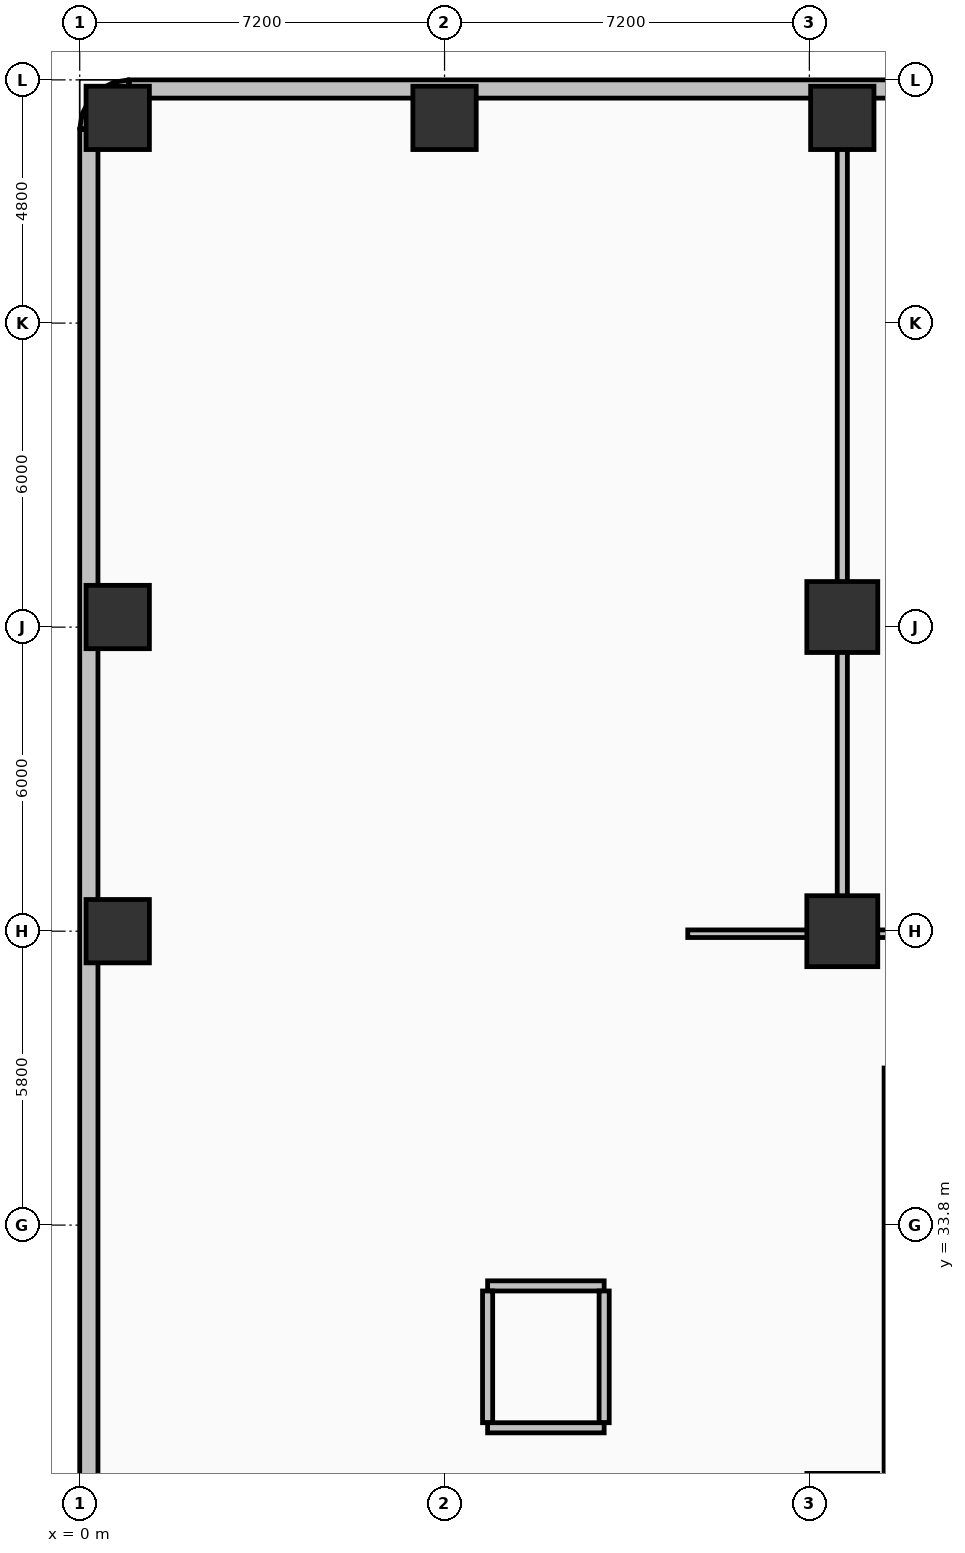
"""IFC4 building model, lengths in metres.
Left out: names, types, materials, properties, quantities, classifications, styles, units other than length and angle.
Written with IfcOpenShell. Run it as: python <this file> out.ifc"""

import sys

from ifc_helpers import new_model, si_unit, direction, frame, frame_2d, origin, origin_2d, place, context, subcontext, project, spatial, rectangle, extrude, element, fill, save


model = new_model("IFC4")
c1 = context("Model", 3, precision=1e-05, world=origin(), true_north=direction((0.0, 1.0)))
c2 = subcontext(c1, "Body", "Model", "MODEL_VIEW")
j1 = project(units=[si_unit("LENGTHUNIT", "METRE"), si_unit("PLANEANGLEUNIT", "RADIAN")], contexts=[c1])
p1 = place(None, origin())
s1 = spatial("IfcSite", under=j1, at=p1, CompositionType="ELEMENT")
p2 = place(p1, origin())
s2 = spatial("IfcBuilding", under=s1, at=p2, CompositionType="ELEMENT")
p3 = place(p2, frame((0.0, 0.0, 11.1)))
s3 = spatial("IfcBuildingStorey", under=s2, at=p3, CompositionType="ELEMENT", Elevation=11.1)
for number, where, z_axis, x_axis in (
    (1, (0.75, 39.6, 0.0), (0.0, 0.0, 1.0), (1.0, 0.0, 0.0)),
    (2, (0.75, 45.8, 0.0), (0.0, 0.0, 1.0), (1.0, 0.0, 0.0)),
    (3, (0.75, 55.65, 0.0), (0.0, 0.0, 1.0), (1.0, 0.0, 0.0)),
    (4, (7.2, 55.65, 0.0), (0.0, 0.0, 1.0), (1.0, 0.0, 0.0)),
    (5, (15.05, 55.65, 0.0), (0.0, 0.0, 1.0), (1.0, 0.0, 0.0)),
):
    element("IfcColumn", number, at=place(p3, frame(where, z_axis=z_axis, x_axis=x_axis)), inside=s3, PredefinedType="COLUMN", context=c2, shape_type="SweptSolid", body=[
        extrude(rectangle(XDim=1.25, YDim=1.25, at=origin_2d()), origin(), (0.0, 0.0, 1.0), 4.5),
    ])
for number, where, z_axis, x_axis in (
    (6, (15.05, 39.6, 0.0), (0.0, 0.0, 1.0), (1.0, 0.0, 0.0)),
    (7, (15.05, 45.8, 0.0), (0.0, 0.0, 1.0), (1.0, 0.0, 0.0)),
):
    element("IfcColumn", number, at=place(p3, frame(where, z_axis=z_axis, x_axis=x_axis)), inside=s3, PredefinedType="COLUMN", context=c2, shape_type="SweptSolid", body=[
        extrude(rectangle(XDim=1.4, YDim=1.4, at=origin_2d()), origin(), (0.0, 0.0, 1.0), 4.5),
    ])
p4 = place(p3, frame((56.57, 56.22, 0.0), z_axis=(0.0, 0.0, 1.0), x_axis=(-1.0, 0.0, 0.0)))
e8 = element("IfcWall", 8, at=p4, inside=s3, PredefinedType="SOLIDWALL", context=c2, shape_type="SweptSolid", body=[
    extrude(rectangle(XDim=55.59, YDim=0.36, at=frame_2d((27.795, 0.0))), origin(), (0.0, 0.0, 1.0), 3.48),
])
p5 = place(p4, frame((0.747, 0.0, 0.9)))
e9 = element("IfcOpeningElement", 9, at=p5, cuts=e8, PredefinedType="OPENING", context=c2, shape_type="SweptSolid", body=[
    extrude(rectangle(XDim=1.8, YDim=2.1, at=frame_2d((0.9, 1.05))), frame((0.0, 0.19, 0.0), z_axis=(0.0, -1.0, 0.0), x_axis=(1.0, 0.0, 0.0)), (0.0, 0.0, 1.0), 0.38),
])
p6 = place(p4, frame((5.19, 0.0, 0.9)))
e10 = element("IfcOpeningElement", 10, at=p6, cuts=e8, PredefinedType="OPENING", context=c2, shape_type="SweptSolid", body=[
    extrude(rectangle(XDim=1.8, YDim=2.1, at=frame_2d((0.9, 1.05))), frame((0.0, 0.19, 0.0), z_axis=(0.0, -1.0, 0.0), x_axis=(1.0, 0.0, 0.0)), (0.0, 0.0, 1.0), 0.38),
])
p7 = place(p4, frame((8.233, 0.0, 0.9)))
e11 = element("IfcOpeningElement", 11, at=p7, cuts=e8, PredefinedType="OPENING", context=c2, shape_type="SweptSolid", body=[
    extrude(rectangle(XDim=1.8, YDim=2.1, at=frame_2d((0.9, 1.05))), frame((0.0, 0.19, 0.0), z_axis=(0.0, -1.0, 0.0), x_axis=(1.0, 0.0, 0.0)), (0.0, 0.0, 1.0), 0.38),
])
p8 = place(p4, frame((11.626, 0.0, 0.9)))
e12 = element("IfcOpeningElement", 12, at=p8, cuts=e8, PredefinedType="OPENING", context=c2, shape_type="SweptSolid", body=[
    extrude(rectangle(XDim=1.8, YDim=2.1, at=frame_2d((0.9, 1.05))), frame((0.0, 0.19, 0.0), z_axis=(0.0, -1.0, 0.0), x_axis=(1.0, 0.0, 0.0)), (0.0, 0.0, 1.0), 0.38),
])
p9 = place(p4, frame((14.319, 0.0, 0.9)))
e13 = element("IfcOpeningElement", 13, at=p9, cuts=e8, PredefinedType="OPENING", context=c2, shape_type="SweptSolid", body=[
    extrude(rectangle(XDim=1.8, YDim=2.1, at=frame_2d((0.9, 1.05))), frame((0.0, 0.19, 0.0), z_axis=(0.0, -1.0, 0.0), x_axis=(1.0, 0.0, 0.0)), (0.0, 0.0, 1.0), 0.38),
])
p10 = place(p4, frame((18.762, 0.0, 0.9)))
e14 = element("IfcOpeningElement", 14, at=p10, cuts=e8, PredefinedType="OPENING", context=c2, shape_type="SweptSolid", body=[
    extrude(rectangle(XDim=1.8, YDim=2.1, at=frame_2d((0.9, 1.05))), frame((0.0, 0.19, 0.0), z_axis=(0.0, -1.0, 0.0), x_axis=(1.0, 0.0, 0.0)), (0.0, 0.0, 1.0), 0.38),
])
p11 = place(p4, frame((21.805, 0.0, 0.9)))
e15 = element("IfcOpeningElement", 15, at=p11, cuts=e8, PredefinedType="OPENING", context=c2, shape_type="SweptSolid", body=[
    extrude(rectangle(XDim=1.8, YDim=2.1, at=frame_2d((0.9, 1.05))), frame((0.0, 0.19, 0.0), z_axis=(0.0, -1.0, 0.0), x_axis=(1.0, 0.0, 0.0)), (0.0, 0.0, 1.0), 0.38),
])
p12 = place(p4, frame((25.198, 0.0, 0.9)))
e16 = element("IfcOpeningElement", 16, at=p12, cuts=e8, PredefinedType="OPENING", context=c2, shape_type="SweptSolid", body=[
    extrude(rectangle(XDim=1.8, YDim=2.1, at=frame_2d((0.9, 1.05))), frame((0.0, 0.19, 0.0), z_axis=(0.0, -1.0, 0.0), x_axis=(1.0, 0.0, 0.0)), (0.0, 0.0, 1.0), 0.38),
])
p13 = place(p4, frame((27.892, 0.0, 0.9)))
e17 = element("IfcOpeningElement", 17, at=p13, cuts=e8, PredefinedType="OPENING", context=c2, shape_type="SweptSolid", body=[
    extrude(rectangle(XDim=1.8, YDim=2.1, at=frame_2d((0.9, 1.05))), frame((0.0, 0.19, 0.0), z_axis=(0.0, -1.0, 0.0), x_axis=(1.0, 0.0, 0.0)), (0.0, 0.0, 1.0), 0.38),
])
p14 = place(p4, frame((32.335, 0.0, 0.9)))
e18 = element("IfcOpeningElement", 18, at=p14, cuts=e8, PredefinedType="OPENING", context=c2, shape_type="SweptSolid", body=[
    extrude(rectangle(XDim=1.8, YDim=2.1, at=frame_2d((0.9, 1.05))), frame((0.0, 0.19, 0.0), z_axis=(0.0, -1.0, 0.0), x_axis=(1.0, 0.0, 0.0)), (0.0, 0.0, 1.0), 0.38),
])
p15 = place(p4, frame((35.378, 0.0, 0.9)))
e19 = element("IfcOpeningElement", 19, at=p15, cuts=e8, PredefinedType="OPENING", context=c2, shape_type="SweptSolid", body=[
    extrude(rectangle(XDim=1.8, YDim=2.1, at=frame_2d((0.9, 1.05))), frame((0.0, 0.19, 0.0), z_axis=(0.0, -1.0, 0.0), x_axis=(1.0, 0.0, 0.0)), (0.0, 0.0, 1.0), 0.38),
])
p16 = place(p4, frame((38.421, 0.0, 0.9)))
e20 = element("IfcOpeningElement", 20, at=p16, cuts=e8, PredefinedType="OPENING", context=c2, shape_type="SweptSolid", body=[
    extrude(rectangle(XDim=1.8, YDim=2.1, at=frame_2d((0.9, 1.05))), frame((0.0, 0.19, 0.0), z_axis=(0.0, -1.0, 0.0), x_axis=(1.0, 0.0, 0.0)), (0.0, 0.0, 1.0), 0.38),
])
p17 = place(p4, frame((42.864, 0.0, 0.9)))
e21 = element("IfcOpeningElement", 21, at=p17, cuts=e8, PredefinedType="OPENING", context=c2, shape_type="SweptSolid", body=[
    extrude(rectangle(XDim=1.8, YDim=2.1, at=frame_2d((0.9, 1.05))), frame((0.0, 0.19, 0.0), z_axis=(0.0, -1.0, 0.0), x_axis=(1.0, 0.0, 0.0)), (0.0, 0.0, 1.0), 0.38),
])
p18 = place(p4, frame((45.557, 0.0, 0.9)))
e22 = element("IfcOpeningElement", 22, at=p18, cuts=e8, PredefinedType="OPENING", context=c2, shape_type="SweptSolid", body=[
    extrude(rectangle(XDim=1.8, YDim=2.1, at=frame_2d((0.9, 1.05))), frame((0.0, 0.19, 0.0), z_axis=(0.0, -1.0, 0.0), x_axis=(1.0, 0.0, 0.0)), (0.0, 0.0, 1.0), 0.38),
])
p19 = place(p4, frame((52.344, 0.0, 0.9)))
e23 = element("IfcOpeningElement", 23, at=p19, cuts=e8, PredefinedType="OPENING", context=c2, shape_type="SweptSolid", body=[
    extrude(rectangle(XDim=1.8, YDim=2.1, at=frame_2d((0.9, 1.05))), frame((0.0, 0.19, 0.0), z_axis=(0.0, -1.0, 0.0), x_axis=(1.0, 0.0, 0.0)), (0.0, 0.0, 1.0), 0.38),
])
p20 = place(p3, frame((0.98, 56.22, 0.0), z_axis=(0.0, 0.0, 1.0), x_axis=(-0.987731290312, -0.156163049852, 0.0)))
e24 = element("IfcWall", 24, at=p20, inside=s3, PredefinedType="SOLIDWALL", context=c2, shape_type="SweptSolid", body=[
    extrude(rectangle(XDim=0.25, YDim=0.36, at=frame_2d((0.125, 0.0))), origin(), (0.0, 0.0, 1.0), 3.48),
])
p21 = place(p3, frame((0.733, 56.181, 0.0), z_axis=(0.0, 0.0, 1.0), x_axis=(-0.89089067942, -0.454217786225, 0.0)))
e25 = element("IfcWall", 25, at=p21, inside=s3, PredefinedType="SOLIDWALL", context=c2, shape_type="SweptSolid", body=[
    extrude(rectangle(XDim=0.25, YDim=0.36, at=frame_2d((0.125, 0.0))), origin(), (0.0, 0.0, 1.0), 3.48),
])
for number, where, z_axis, x_axis in (
    (26, (0.51, 56.067, 0.0), (0.0, 0.0, 1.0), (-0.707, -0.707, 0.0)),
    (27, (0.333, 55.89, 0.0), (0.0, 0.0, 1.0), (-0.454, -0.891, 0.0)),
):
    element("IfcWall", number, at=place(p3, frame(where, z_axis=z_axis, x_axis=x_axis)), inside=s3, PredefinedType="SOLIDWALL", context=c2, shape_type="SweptSolid", body=[
        extrude(rectangle(XDim=0.25, YDim=0.36, at=frame_2d((0.125, 0.0))), origin(), (0.0, 0.0, 1.0), 3.48),
    ])
p22 = place(p3, frame((0.219, 55.667, 0.0), z_axis=(0.0, 0.0, 1.0), x_axis=(-0.156963773077, -0.987604361038, 0.0)))
e28 = element("IfcWall", 28, at=p22, inside=s3, PredefinedType="SOLIDWALL", context=c2, shape_type="SweptSolid", body=[
    extrude(rectangle(XDim=0.25, YDim=0.36, at=frame_2d((0.125, 0.0))), origin(), (0.0, 0.0, 1.0), 3.48),
])
p23 = place(p3, frame((0.18, 55.42, 0.0), z_axis=(0.0, 0.0, 1.0), x_axis=(0.0, -1.0, 0.0)))
e29 = element("IfcWall", 29, at=p23, inside=s3, PredefinedType="SOLIDWALL", context=c2, shape_type="SweptSolid", body=[
    extrude(rectangle(XDim=54.44, YDim=0.36, at=frame_2d((27.22, 0.0))), origin(), (0.0, 0.0, 1.0), 3.48),
])
p24 = place(p23, frame((1.411, 0.0, 0.9)))
e30 = element("IfcOpeningElement", 30, at=p24, cuts=e29, PredefinedType="OPENING", context=c2, shape_type="SweptSolid", body=[
    extrude(rectangle(XDim=1.8, YDim=2.1, at=frame_2d((0.9, 1.05))), frame((0.0, 0.19, 0.0), z_axis=(0.0, -1.0, 0.0), x_axis=(1.0, 0.0, 0.0)), (0.0, 0.0, 1.0), 0.38),
])
p25 = place(p23, frame((4.732, 0.0, 0.9)))
e31 = element("IfcOpeningElement", 31, at=p25, cuts=e29, PredefinedType="OPENING", context=c2, shape_type="SweptSolid", body=[
    extrude(rectangle(XDim=1.8, YDim=2.1, at=frame_2d((0.9, 1.05))), frame((0.0, 0.19, 0.0), z_axis=(0.0, -1.0, 0.0), x_axis=(1.0, 0.0, 0.0)), (0.0, 0.0, 1.0), 0.38),
])
p26 = place(p23, frame((11.375, 0.0, 0.9)))
e32 = element("IfcOpeningElement", 32, at=p26, cuts=e29, PredefinedType="OPENING", context=c2, shape_type="SweptSolid", body=[
    extrude(rectangle(XDim=1.8, YDim=2.1, at=frame_2d((0.9, 1.05))), frame((0.0, 0.19, 0.0), z_axis=(0.0, -1.0, 0.0), x_axis=(1.0, 0.0, 0.0)), (0.0, 0.0, 1.0), 0.38),
])
p27 = place(p23, frame((18.017, 0.0, 0.9)))
e33 = element("IfcOpeningElement", 33, at=p27, cuts=e29, PredefinedType="OPENING", context=c2, shape_type="SweptSolid", body=[
    extrude(rectangle(XDim=1.8, YDim=2.1, at=frame_2d((0.9, 1.05))), frame((0.0, 0.19, 0.0), z_axis=(0.0, -1.0, 0.0), x_axis=(1.0, 0.0, 0.0)), (0.0, 0.0, 1.0), 0.38),
])
p28 = place(p23, frame((21.338, 0.0, 0.9)))
e34 = element("IfcOpeningElement", 34, at=p28, cuts=e29, PredefinedType="OPENING", context=c2, shape_type="SweptSolid", body=[
    extrude(rectangle(XDim=1.8, YDim=2.1, at=frame_2d((0.9, 1.05))), frame((0.0, 0.19, 0.0), z_axis=(0.0, -1.0, 0.0), x_axis=(1.0, 0.0, 0.0)), (0.0, 0.0, 1.0), 0.38),
])
p29 = place(p23, frame((23.959, 0.0, 0.9)))
e35 = element("IfcOpeningElement", 35, at=p29, cuts=e29, PredefinedType="OPENING", context=c2, shape_type="SweptSolid", body=[
    extrude(rectangle(XDim=1.8, YDim=2.1, at=frame_2d((0.9, 1.05))), frame((0.0, 0.19, 0.0), z_axis=(0.0, -1.0, 0.0), x_axis=(1.0, 0.0, 0.0)), (0.0, 0.0, 1.0), 0.38),
])
p30 = place(p23, frame((28.681, 0.0, 0.9)))
e36 = element("IfcOpeningElement", 36, at=p30, cuts=e29, PredefinedType="OPENING", context=c2, shape_type="SweptSolid", body=[
    extrude(rectangle(XDim=1.8, YDim=2.1, at=frame_2d((0.9, 1.05))), frame((0.0, 0.19, 0.0), z_axis=(0.0, -1.0, 0.0), x_axis=(1.0, 0.0, 0.0)), (0.0, 0.0, 1.0), 0.38),
])
p31 = place(p23, frame((31.302, 0.0, 0.9)))
e37 = element("IfcOpeningElement", 37, at=p31, cuts=e29, PredefinedType="OPENING", context=c2, shape_type="SweptSolid", body=[
    extrude(rectangle(XDim=1.8, YDim=2.1, at=frame_2d((0.9, 1.05))), frame((0.0, 0.19, 0.0), z_axis=(0.0, -1.0, 0.0), x_axis=(1.0, 0.0, 0.0)), (0.0, 0.0, 1.0), 0.38),
])
p32 = place(p23, frame((34.623, 0.0, 0.9)))
e38 = element("IfcOpeningElement", 38, at=p32, cuts=e29, PredefinedType="OPENING", context=c2, shape_type="SweptSolid", body=[
    extrude(rectangle(XDim=1.8, YDim=2.1, at=frame_2d((0.9, 1.05))), frame((0.0, 0.19, 0.0), z_axis=(0.0, -1.0, 0.0), x_axis=(1.0, 0.0, 0.0)), (0.0, 0.0, 1.0), 0.38),
])
p33 = place(p23, frame((41.266, 0.0, 0.9)))
e39 = element("IfcOpeningElement", 39, at=p33, cuts=e29, PredefinedType="OPENING", context=c2, shape_type="SweptSolid", body=[
    extrude(rectangle(XDim=1.8, YDim=2.1, at=frame_2d((0.9, 1.05))), frame((0.0, 0.19, 0.0), z_axis=(0.0, -1.0, 0.0), x_axis=(1.0, 0.0, 0.0)), (0.0, 0.0, 1.0), 0.38),
])
p34 = place(p23, frame((47.908, 0.0, 0.9)))
e40 = element("IfcOpeningElement", 40, at=p34, cuts=e29, PredefinedType="OPENING", context=c2, shape_type="SweptSolid", body=[
    extrude(rectangle(XDim=1.8, YDim=2.1, at=frame_2d((0.9, 1.05))), frame((0.0, 0.19, 0.0), z_axis=(0.0, -1.0, 0.0), x_axis=(1.0, 0.0, 0.0)), (0.0, 0.0, 1.0), 0.38),
])
p35 = place(p23, frame((51.229, 0.0, 0.9)))
e41 = element("IfcOpeningElement", 41, at=p35, cuts=e29, PredefinedType="OPENING", context=c2, shape_type="SweptSolid", body=[
    extrude(rectangle(XDim=1.8, YDim=2.1, at=frame_2d((0.9, 1.05))), frame((0.0, 0.19, 0.0), z_axis=(0.0, -1.0, 0.0), x_axis=(1.0, 0.0, 0.0)), (0.0, 0.0, 1.0), 0.38),
])
p36 = place(p3, frame((8.05, 32.6, 0.0), z_axis=(0.0, 0.0, 1.0), x_axis=(1.0, 0.0, 0.0)))
e42 = element("IfcWall", 42, at=p36, inside=s3, PredefinedType="PARTITIONING", context=c2, shape_type="SweptSolid", body=[
    extrude(rectangle(XDim=2.3, YDim=0.2, at=frame_2d((1.15, 0.0))), origin(), (0.0, 0.0, 1.0), 3.42),
])
for number, where, z_axis, x_axis in (
    (43, (8.05, 29.9, 0.0), (0.0, 0.0, 1.0), (0.0, 1.0, 0.0)),
    (44, (10.35, 29.9, 0.0), (0.0, 0.0, 1.0), (0.0, 1.0, 0.0)),
):
    element("IfcWall", number, at=place(p3, frame(where, z_axis=z_axis, x_axis=x_axis)), inside=s3, PredefinedType="PARTITIONING", context=c2, shape_type="SweptSolid", body=[
        extrude(rectangle(XDim=2.6, YDim=0.2, at=frame_2d((1.3, 0.0))), origin(), (0.0, 0.0, 1.0), 3.42),
    ])
p37 = place(p3, frame((8.05, 29.8, 0.0), z_axis=(0.0, 0.0, 1.0), x_axis=(1.0, 0.0, 0.0)))
e45 = element("IfcWall", 45, at=p37, inside=s3, PredefinedType="PARTITIONING", context=c2, shape_type="SweptSolid", body=[
    extrude(rectangle(XDim=2.3, YDim=0.2, at=frame_2d((1.15, 0.0))), origin(), (0.0, 0.0, 1.0), 3.42),
])
p38 = place(p37, frame((0.65, 0.0, 0.0)))
e46 = element("IfcOpeningElement", 46, at=p38, cuts=e45, PredefinedType="OPENING", context=c2, shape_type="SweptSolid", body=[
    extrude(rectangle(XDim=1.0, YDim=2.15, at=frame_2d((0.5, 1.075))), frame((0.0, 0.11, 0.0), z_axis=(0.0, -1.0, 0.0), x_axis=(1.0, 0.0, 0.0)), (0.0, 0.0, 1.0), 0.22),
])
p39 = place(p3, frame((15.95, 19.5, 0.0), z_axis=(0.0, 0.0, 1.0), x_axis=(0.0, 1.0, 0.0)))
e47 = element("IfcWall", 47, at=p39, inside=s3, PredefinedType="PARTITIONING", context=c2, shape_type="SweptSolid", body=[
    extrude(rectangle(XDim=17.4, YDim=0.15, at=frame_2d((8.7, 0.0))), origin(), (0.0, 0.0, 1.0), 3.42),
])
p40 = place(p3, frame((15.05, 39.6, 0.0), z_axis=(0.0, 0.0, 1.0), x_axis=(0.0, 1.0, 0.0)))
e48 = element("IfcWall", 48, at=p40, inside=s3, PredefinedType="PARTITIONING", context=c2, shape_type="SweptSolid", body=[
    extrude(rectangle(XDim=16.4, YDim=0.2, at=frame_2d((8.2, 0.0))), origin(), (0.0, 0.0, 1.0), 3.42),
])
p41 = place(p40, frame((3.4, 0.0, 0.0)))
e49 = element("IfcOpeningElement", 49, at=p41, cuts=e48, PredefinedType="OPENING", context=c2, shape_type="SweptSolid", body=[
    extrude(rectangle(XDim=1.0, YDim=2.15, at=frame_2d((0.5, 1.075))), frame((0.0, 0.11, 0.0), z_axis=(0.0, -1.0, 0.0), x_axis=(1.0, 0.0, 0.0)), (0.0, 0.0, 1.0), 0.22),
])
p42 = place(p3, frame((25.25, 39.55, 0.0), z_axis=(0.0, 0.0, 1.0), x_axis=(-1.0, 0.0, 0.0)))
e50 = element("IfcWall", 50, at=p42, inside=s3, PredefinedType="PARTITIONING", context=c2, shape_type="SweptSolid", body=[
    extrude(rectangle(XDim=13.25, YDim=0.15, at=frame_2d((6.625, 0.0))), origin(), (0.0, 0.0, 1.0), 3.42),
])
p43 = place(p42, frame((4.2, 0.0, 0.0)))
e51 = element("IfcOpeningElement", 51, at=p43, cuts=e50, PredefinedType="OPENING", context=c2, shape_type="SweptSolid", body=[
    extrude(rectangle(XDim=1.0, YDim=2.15, at=frame_2d((0.5, 1.075))), frame((0.0, 0.085, 0.0), z_axis=(0.0, -1.0, 0.0), x_axis=(1.0, 0.0, 0.0)), (0.0, 0.0, 1.0), 0.17),
])
p44 = place(p17, origin())
e52 = element("IfcWindow", 52, at=p44, inside=s3, PartitioningType="SINGLE_PANEL", PredefinedType="WINDOW", context=c2, shape_type="SweptSolid", body=[
    extrude(rectangle(XDim=1.8, YDim=2.1, at=frame_2d((0.9, 1.05))), frame((0.0, 0.03, 0.0), z_axis=(0.0, -1.0, 0.0), x_axis=(1.0, 0.0, 0.0)), (0.0, 0.0, 1.0), 0.06),
])
fill(e21, e52)
p45 = place(p18, origin())
e53 = element("IfcWindow", 53, at=p45, inside=s3, PartitioningType="SINGLE_PANEL", PredefinedType="WINDOW", context=c2, shape_type="SweptSolid", body=[
    extrude(rectangle(XDim=1.8, YDim=2.1, at=frame_2d((0.9, 1.05))), frame((0.0, 0.03, 0.0), z_axis=(0.0, -1.0, 0.0), x_axis=(1.0, 0.0, 0.0)), (0.0, 0.0, 1.0), 0.06),
])
fill(e22, e53)
p46 = place(p19, origin())
e54 = element("IfcWindow", 54, at=p46, inside=s3, PartitioningType="SINGLE_PANEL", PredefinedType="WINDOW", context=c2, shape_type="SweptSolid", body=[
    extrude(rectangle(XDim=1.8, YDim=2.1, at=frame_2d((0.9, 1.05))), frame((0.0, 0.03, 0.0), z_axis=(0.0, -1.0, 0.0), x_axis=(1.0, 0.0, 0.0)), (0.0, 0.0, 1.0), 0.06),
])
fill(e23, e54)
p47 = place(p24, origin())
e55 = element("IfcWindow", 55, at=p47, inside=s3, PartitioningType="SINGLE_PANEL", PredefinedType="WINDOW", context=c2, shape_type="SweptSolid", body=[
    extrude(rectangle(XDim=1.8, YDim=2.1, at=frame_2d((0.9, 1.05))), frame((0.0, 0.03, 0.0), z_axis=(0.0, -1.0, 0.0), x_axis=(1.0, 0.0, 0.0)), (0.0, 0.0, 1.0), 0.06),
])
fill(e30, e55)
p48 = place(p25, origin())
e56 = element("IfcWindow", 56, at=p48, inside=s3, PartitioningType="SINGLE_PANEL", PredefinedType="WINDOW", context=c2, shape_type="SweptSolid", body=[
    extrude(rectangle(XDim=1.8, YDim=2.1, at=frame_2d((0.9, 1.05))), frame((0.0, 0.03, 0.0), z_axis=(0.0, -1.0, 0.0), x_axis=(1.0, 0.0, 0.0)), (0.0, 0.0, 1.0), 0.06),
])
fill(e31, e56)
p49 = place(p26, origin())
e57 = element("IfcWindow", 57, at=p49, inside=s3, PartitioningType="SINGLE_PANEL", PredefinedType="WINDOW", context=c2, shape_type="SweptSolid", body=[
    extrude(rectangle(XDim=1.8, YDim=2.1, at=frame_2d((0.9, 1.05))), frame((0.0, 0.03, 0.0), z_axis=(0.0, -1.0, 0.0), x_axis=(1.0, 0.0, 0.0)), (0.0, 0.0, 1.0), 0.06),
])
fill(e32, e57)
p50 = place(p27, origin())
e58 = element("IfcWindow", 58, at=p50, inside=s3, PartitioningType="SINGLE_PANEL", PredefinedType="WINDOW", context=c2, shape_type="SweptSolid", body=[
    extrude(rectangle(XDim=1.8, YDim=2.1, at=frame_2d((0.9, 1.05))), frame((0.0, 0.03, 0.0), z_axis=(0.0, -1.0, 0.0), x_axis=(1.0, 0.0, 0.0)), (0.0, 0.0, 1.0), 0.06),
])
fill(e33, e58)
p51 = place(p28, origin())
e59 = element("IfcWindow", 59, at=p51, inside=s3, PartitioningType="SINGLE_PANEL", PredefinedType="WINDOW", context=c2, shape_type="SweptSolid", body=[
    extrude(rectangle(XDim=1.8, YDim=2.1, at=frame_2d((0.9, 1.05))), frame((0.0, 0.03, 0.0), z_axis=(0.0, -1.0, 0.0), x_axis=(1.0, 0.0, 0.0)), (0.0, 0.0, 1.0), 0.06),
])
fill(e34, e59)
p52 = place(p29, origin())
e60 = element("IfcWindow", 60, at=p52, inside=s3, PartitioningType="SINGLE_PANEL", PredefinedType="WINDOW", context=c2, shape_type="SweptSolid", body=[
    extrude(rectangle(XDim=1.8, YDim=2.1, at=frame_2d((0.9, 1.05))), frame((0.0, 0.03, 0.0), z_axis=(0.0, -1.0, 0.0), x_axis=(1.0, 0.0, 0.0)), (0.0, 0.0, 1.0), 0.06),
])
fill(e35, e60)
p53 = place(p38, origin())
e61 = element("IfcDoor", 61, at=p53, inside=s3, OperationType="SLIDING_TO_LEFT", PredefinedType="DOOR", context=c2, shape_type="SweptSolid", body=[
    extrude(rectangle(XDim=1.0, YDim=2.15, at=frame_2d((0.5, 1.075))), frame((0.0, 0.025, 0.0), z_axis=(0.0, -1.0, 0.0), x_axis=(1.0, 0.0, 0.0)), (0.0, 0.0, 1.0), 0.05),
])
fill(e46, e61)
p54 = place(p41, origin())
e62 = element("IfcDoor", 62, at=p54, inside=s3, OperationType="SINGLE_SWING_LEFT", PredefinedType="DOOR", context=c2, shape_type="SweptSolid", body=[
    extrude(rectangle(XDim=1.0, YDim=2.15, at=frame_2d((0.5, 1.075))), frame((0.0, 0.025, 0.0), z_axis=(0.0, -1.0, 0.0), x_axis=(1.0, 0.0, 0.0)), (0.0, 0.0, 1.0), 0.05),
])
fill(e49, e62)
save(model, sys.argv[1])
